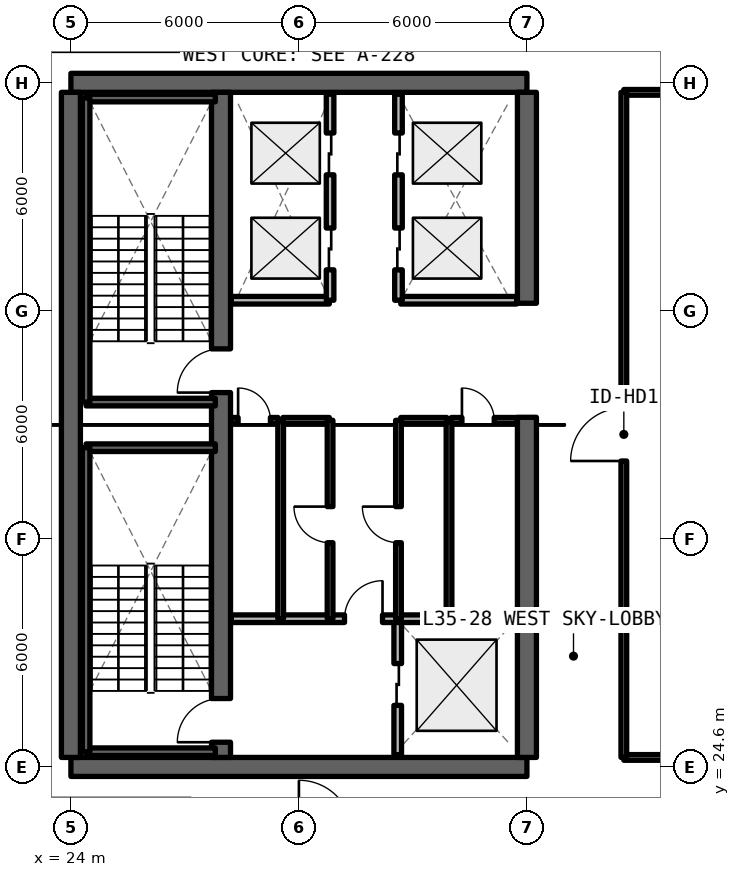
"""IFC4 building model, lengths in metres.
Left out: names, types, materials, properties, quantities, classifications, styles, units other than length and angle.
Written with IfcOpenShell. Run it as: python <this file> out.ifc"""

import sys

from ifc_helpers import new_model, si_unit, direction, frame, frame_2d, origin, place, context, subcontext, project, spatial, rectangle, extrude, element, fill, save


model = new_model("IFC4")
c1 = context("Model", 3, precision=1e-05, world=origin(), true_north=direction((0.0, 1.0)))
c2 = subcontext(c1, "Body", "Model", "MODEL_VIEW")
j1 = project(units=[si_unit("LENGTHUNIT", "METRE"), si_unit("PLANEANGLEUNIT", "RADIAN")], contexts=[c1])
p1 = place(None, origin())
s1 = spatial("IfcSite", under=j1, at=p1, CompositionType="ELEMENT")
p2 = place(p1, origin())
s2 = spatial("IfcBuilding", under=s1, at=p2, CompositionType="ELEMENT")
p3 = place(p2, frame((0.0, 0.0, 128.04)))
s3 = spatial("IfcBuildingStorey", under=s2, at=p3, CompositionType="ELEMENT", Elevation=128.04)
for number, where, z_axis, x_axis in (
    (1, (24.0, 24.6, 0.0), (0.0, 0.0, 1.0), (1.0, 0.0, 0.0)),
    (2, (36.0, 42.6, 0.0), (0.0, 0.0, 1.0), (-1.0, 0.0, 0.0)),
):
    element("IfcWall", number, at=place(p3, frame(where, z_axis=z_axis, x_axis=x_axis)), inside=s3, PredefinedType="SHEAR", context=c2, shape_type="SweptSolid", body=[
        extrude(rectangle(XDim=12.0, YDim=0.5, at=frame_2d((6.0, 0.0))), origin(), (0.0, 0.0, 1.0), 3.96),
    ])
p4 = place(p3, frame((24.0, 24.85, 0.0), z_axis=(0.0, 0.0, 1.0), x_axis=(0.0, 1.0, 0.0)))
e3 = element("IfcWall", 3, at=p4, inside=s3, PredefinedType="SHEAR", context=c2, shape_type="SweptSolid", body=[
    extrude(rectangle(XDim=17.5, YDim=0.5, at=frame_2d((8.75, 0.0))), origin(), (0.0, 0.0, 1.0), 3.96),
])
p5 = place(p3, frame((36.0, 24.85, 0.0), z_axis=(0.0, 0.0, 1.0), x_axis=(0.0, 1.0, 0.0)))
e4 = element("IfcWall", 4, at=p5, inside=s3, PredefinedType="SHEAR", context=c2, shape_type="SweptSolid", body=[
    extrude(rectangle(XDim=8.95, YDim=0.5, at=frame_2d((4.475, 0.0))), origin(), (0.0, 0.0, 1.0), 3.96),
])
p6 = place(p3, frame((36.0, 36.8, 0.0), z_axis=(0.0, 0.0, 1.0), x_axis=(0.0, 1.0, 0.0)))
e5 = element("IfcWall", 5, at=p6, inside=s3, PredefinedType="SHEAR", context=c2, shape_type="SweptSolid", body=[
    extrude(rectangle(XDim=5.55, YDim=0.5, at=frame_2d((2.775, 0.0))), origin(), (0.0, 0.0, 1.0), 3.96),
])
p7 = place(p3, frame((27.95, 24.85, 0.0), z_axis=(0.0, 0.0, 1.0), x_axis=(0.0, 1.0, 0.0)))
e6 = element("IfcWall", 6, at=p7, inside=s3, PredefinedType="SHEAR", context=c2, shape_type="SweptSolid", body=[
    extrude(rectangle(XDim=17.5, YDim=0.5, at=frame_2d((8.75, 0.0))), origin(), (0.0, 0.0, 1.0), 3.96),
])
p8 = place(p7, frame((0.4, 0.0, 0.0)))
e7 = element("IfcOpeningElement", 7, at=p8, cuts=e6, PredefinedType="OPENING", context=c2, shape_type="SweptSolid", body=[
    extrude(rectangle(XDim=1.15, YDim=2.15, at=frame_2d((0.575, 1.075))), frame((0.0, 0.26, 0.0), z_axis=(0.0, -1.0, 0.0), x_axis=(1.0, 0.0, 0.0)), (0.0, 0.0, 1.0), 0.52),
])
p9 = place(p7, frame((9.6, 0.0, 0.0)))
e8 = element("IfcOpeningElement", 8, at=p9, cuts=e6, PredefinedType="OPENING", context=c2, shape_type="SweptSolid", body=[
    extrude(rectangle(XDim=1.15, YDim=2.15, at=frame_2d((0.575, 1.075))), frame((0.0, 0.26, 0.0), z_axis=(0.0, -1.0, 0.0), x_axis=(1.0, 0.0, 0.0)), (0.0, 0.0, 1.0), 0.52),
])
p10 = place(p3, frame((32.6, 24.92, 0.0), z_axis=(0.0, 0.0, 1.0), x_axis=(0.0, 1.0, 0.0)))
e9 = element("IfcWall", 9, at=p10, inside=s3, PredefinedType="SOLIDWALL", context=c2, shape_type="SweptSolid", body=[
    extrude(rectangle(XDim=3.58, YDim=0.2, at=frame_2d((1.79, 0.0))), origin(), (0.0, 0.0, 1.0), 2.96),
])
p11 = place(p10, frame((1.3, 0.0, 0.0)))
e10 = element("IfcOpeningElement", 10, at=p11, cuts=e9, PredefinedType="OPENING", context=c2, shape_type="SweptSolid", body=[
    extrude(rectangle(XDim=1.1, YDim=2.2, at=frame_2d((0.55, 1.1))), frame((0.0, 0.11, 0.0), z_axis=(0.0, -1.0, 0.0), x_axis=(1.0, 0.0, 0.0)), (0.0, 0.0, 1.0), 0.22),
])
p12 = place(p3, frame((28.22, 28.5, 0.0), z_axis=(0.0, 0.0, 1.0), x_axis=(1.0, 0.0, 0.0)))
e11 = element("IfcWall", 11, at=p12, inside=s3, PredefinedType="SOLIDWALL", context=c2, shape_type="SweptSolid", body=[
    extrude(rectangle(XDim=7.51, YDim=0.2, at=frame_2d((3.755, 0.0))), origin(), (0.0, 0.0, 1.0), 2.96),
])
p13 = place(p12, frame((2.98, 0.0, 0.0)))
e12 = element("IfcOpeningElement", 12, at=p13, cuts=e11, PredefinedType="OPENING", context=c2, shape_type="SweptSolid", body=[
    extrude(rectangle(XDim=1.0, YDim=2.15, at=frame_2d((0.5, 1.075))), frame((0.0, 0.11, 0.0), z_axis=(0.0, -1.0, 0.0), x_axis=(1.0, 0.0, 0.0)), (0.0, 0.0, 1.0), 0.22),
])
p14 = place(p3, frame((29.52, 28.5, 0.0), z_axis=(0.0, 0.0, 1.0), x_axis=(0.0, 1.0, 0.0)))
e13 = element("IfcWall", 13, at=p14, inside=s3, PredefinedType="SOLIDWALL", context=c2, shape_type="SweptSolid", body=[
    extrude(rectangle(XDim=5.22, YDim=0.15, at=frame_2d((2.61, 0.0))), origin(), (0.0, 0.0, 1.0), 2.96),
])
p15 = place(p3, frame((28.22, 33.72, 0.0), z_axis=(0.0, 0.0, 1.0), x_axis=(1.0, 0.0, 0.0)))
e14 = element("IfcWall", 14, at=p15, inside=s3, PredefinedType="SOLIDWALL", context=c2, shape_type="SweptSolid", body=[
    extrude(rectangle(XDim=1.23, YDim=0.15, at=frame_2d((0.615, 0.0))), origin(), (0.0, 0.0, 1.0), 2.96),
])
p16 = place(p15, frame((0.18, 0.0, 0.0)))
e15 = element("IfcOpeningElement", 15, at=p16, cuts=e14, PredefinedType="OPENING", context=c2, shape_type="SweptSolid", body=[
    extrude(rectangle(XDim=0.85, YDim=2.1, at=frame_2d((0.425, 1.05))), frame((0.0, 0.085, 0.0), z_axis=(0.0, -1.0, 0.0), x_axis=(1.0, 0.0, 0.0)), (0.0, 0.0, 1.0), 0.17),
])
p17 = place(p3, frame((29.58, 33.72, 0.0), z_axis=(0.0, 0.0, 1.0), x_axis=(1.0, 0.0, 0.0)))
e16 = element("IfcWall", 16, at=p17, inside=s3, PredefinedType="SOLIDWALL", context=c2, shape_type="SweptSolid", body=[
    extrude(rectangle(XDim=1.22, YDim=0.15, at=frame_2d((0.61, 0.0))), origin(), (0.0, 0.0, 1.0), 2.96),
])
p18 = place(p3, frame((30.82, 28.5, 0.0), z_axis=(0.0, 0.0, 1.0), x_axis=(0.0, 1.0, 0.0)))
e17 = element("IfcWall", 17, at=p18, inside=s3, PredefinedType="SOLIDWALL", context=c2, shape_type="SweptSolid", body=[
    extrude(rectangle(XDim=5.22, YDim=0.15, at=frame_2d((2.61, 0.0))), origin(), (0.0, 0.0, 1.0), 2.96),
])
p19 = place(p18, frame((2.0, 0.0, 0.0)))
e18 = element("IfcOpeningElement", 18, at=p19, cuts=e17, PredefinedType="OPENING", context=c2, shape_type="SweptSolid", body=[
    extrude(rectangle(XDim=0.95, YDim=2.15, at=frame_2d((0.475, 1.075))), frame((0.0, 0.085, 0.0), z_axis=(0.0, -1.0, 0.0), x_axis=(1.0, 0.0, 0.0)), (0.0, 0.0, 1.0), 0.17),
])
p20 = place(p3, frame((33.95, 28.5, 0.0), z_axis=(0.0, 0.0, 1.0), x_axis=(0.0, 1.0, 0.0)))
e19 = element("IfcWall", 19, at=p20, inside=s3, PredefinedType="SOLIDWALL", context=c2, shape_type="SweptSolid", body=[
    extrude(rectangle(XDim=5.22, YDim=0.15, at=frame_2d((2.61, 0.0))), origin(), (0.0, 0.0, 1.0), 2.96),
])
p21 = place(p3, frame((32.68, 33.72, 0.0), z_axis=(0.0, 0.0, 1.0), x_axis=(1.0, 0.0, 0.0)))
e20 = element("IfcWall", 20, at=p21, inside=s3, PredefinedType="SOLIDWALL", context=c2, shape_type="SweptSolid", body=[
    extrude(rectangle(XDim=1.21, YDim=0.15, at=frame_2d((0.605, 0.0))), origin(), (0.0, 0.0, 1.0), 2.96),
])
p22 = place(p3, frame((34.01, 33.72, 0.0), z_axis=(0.0, 0.0, 1.0), x_axis=(1.0, 0.0, 0.0)))
e21 = element("IfcWall", 21, at=p22, inside=s3, PredefinedType="SOLIDWALL", context=c2, shape_type="SweptSolid", body=[
    extrude(rectangle(XDim=1.72, YDim=0.15, at=frame_2d((0.86, 0.0))), origin(), (0.0, 0.0, 1.0), 2.96),
])
p23 = place(p22, frame((0.28, 0.0, 0.0)))
e22 = element("IfcOpeningElement", 22, at=p23, cuts=e21, PredefinedType="OPENING", context=c2, shape_type="SweptSolid", body=[
    extrude(rectangle(XDim=0.85, YDim=2.1, at=frame_2d((0.425, 1.05))), frame((0.0, 0.085, 0.0), z_axis=(0.0, -1.0, 0.0), x_axis=(1.0, 0.0, 0.0)), (0.0, 0.0, 1.0), 0.17),
])
p24 = place(p3, frame((32.62, 28.5, 0.0), z_axis=(0.0, 0.0, 1.0), x_axis=(0.0, 1.0, 0.0)))
e23 = element("IfcWall", 23, at=p24, inside=s3, PredefinedType="SOLIDWALL", context=c2, shape_type="SweptSolid", body=[
    extrude(rectangle(XDim=5.22, YDim=0.15, at=frame_2d((2.61, 0.0))), origin(), (0.0, 0.0, 1.0), 2.96),
])
p25 = place(p24, frame((2.0, 0.0, 0.0)))
e24 = element("IfcOpeningElement", 24, at=p25, cuts=e23, PredefinedType="OPENING", context=c2, shape_type="SweptSolid", body=[
    extrude(rectangle(XDim=0.95, YDim=2.15, at=frame_2d((0.475, 1.075))), frame((0.0, 0.085, 0.0), z_axis=(0.0, -1.0, 0.0), x_axis=(1.0, 0.0, 0.0)), (0.0, 0.0, 1.0), 0.17),
])
p26 = place(p3, frame((28.22, 36.88, 0.0), z_axis=(0.0, 0.0, 1.0), x_axis=(1.0, 0.0, 0.0)))
e25 = element("IfcWall", 25, at=p26, inside=s3, PredefinedType="SOLIDWALL", context=c2, shape_type="SweptSolid", body=[
    extrude(rectangle(XDim=2.58, YDim=0.2, at=frame_2d((1.29, 0.0))), origin(), (0.0, 0.0, 1.0), 2.96),
])
p27 = place(p3, frame((30.82, 36.88, 0.0), z_axis=(0.0, 0.0, 1.0), x_axis=(0.0, 1.0, 0.0)))
e26 = element("IfcWall", 26, at=p27, inside=s3, PredefinedType="SOLIDWALL", context=c2, shape_type="SweptSolid", body=[
    extrude(rectangle(XDim=5.42, YDim=0.2, at=frame_2d((2.71, 0.0))), origin(), (0.0, 0.0, 1.0), 2.96),
])
p28 = place(p27, frame((0.8, 0.0, 0.0)))
e27 = element("IfcOpeningElement", 27, at=p28, cuts=e26, PredefinedType="OPENING", context=c2, shape_type="SweptSolid", body=[
    extrude(rectangle(XDim=1.1, YDim=2.2, at=frame_2d((0.55, 1.1))), frame((0.0, 0.11, 0.0), z_axis=(0.0, -1.0, 0.0), x_axis=(1.0, 0.0, 0.0)), (0.0, 0.0, 1.0), 0.22),
])
p29 = place(p27, frame((3.3, 0.0, 0.0)))
e28 = element("IfcOpeningElement", 28, at=p29, cuts=e26, PredefinedType="OPENING", context=c2, shape_type="SweptSolid", body=[
    extrude(rectangle(XDim=1.1, YDim=2.2, at=frame_2d((0.55, 1.1))), frame((0.0, 0.11, 0.0), z_axis=(0.0, -1.0, 0.0), x_axis=(1.0, 0.0, 0.0)), (0.0, 0.0, 1.0), 0.22),
])
p30 = place(p3, frame((32.68, 36.88, 0.0), z_axis=(0.0, 0.0, 1.0), x_axis=(1.0, 0.0, 0.0)))
e29 = element("IfcWall", 29, at=p30, inside=s3, PredefinedType="SOLIDWALL", context=c2, shape_type="SweptSolid", body=[
    extrude(rectangle(XDim=3.05, YDim=0.2, at=frame_2d((1.525, 0.0))), origin(), (0.0, 0.0, 1.0), 2.96),
])
p31 = place(p3, frame((32.62, 36.88, 0.0), z_axis=(0.0, 0.0, 1.0), x_axis=(0.0, 1.0, 0.0)))
e30 = element("IfcWall", 30, at=p31, inside=s3, PredefinedType="SOLIDWALL", context=c2, shape_type="SweptSolid", body=[
    extrude(rectangle(XDim=5.42, YDim=0.2, at=frame_2d((2.71, 0.0))), origin(), (0.0, 0.0, 1.0), 2.96),
])
p32 = place(p31, frame((0.8, 0.0, 0.0)))
e31 = element("IfcOpeningElement", 31, at=p32, cuts=e30, PredefinedType="OPENING", context=c2, shape_type="SweptSolid", body=[
    extrude(rectangle(XDim=1.1, YDim=2.2, at=frame_2d((0.55, 1.1))), frame((0.0, 0.11, 0.0), z_axis=(0.0, -1.0, 0.0), x_axis=(1.0, 0.0, 0.0)), (0.0, 0.0, 1.0), 0.22),
])
p33 = place(p31, frame((3.3, 0.0, 0.0)))
e32 = element("IfcOpeningElement", 32, at=p33, cuts=e30, PredefinedType="OPENING", context=c2, shape_type="SweptSolid", body=[
    extrude(rectangle(XDim=1.1, YDim=2.2, at=frame_2d((0.55, 1.1))), frame((0.0, 0.11, 0.0), z_axis=(0.0, -1.0, 0.0), x_axis=(1.0, 0.0, 0.0)), (0.0, 0.0, 1.0), 0.22),
])
for number, where, z_axis, x_axis in (
    (33, (38.55, 24.85, 0.0), (0.0, 0.0, 1.0), (1.0, 0.0, 0.0)),
    (34, (38.55, 42.35, 0.0), (0.0, 0.0, 1.0), (1.0, 0.0, 0.0)),
):
    element("IfcWall", number, at=place(p3, frame(where, z_axis=z_axis, x_axis=x_axis)), inside=s3, PredefinedType="SOLIDWALL", context=c2, shape_type="SweptSolid", body=[
        extrude(rectangle(XDim=36.9, YDim=0.15, at=frame_2d((18.45, 0.0))), origin(), (0.0, 0.0, 1.0), 2.96),
    ])
p34 = place(p3, frame((38.55, 24.85, 0.0), z_axis=(0.0, 0.0, 1.0), x_axis=(0.0, 1.0, 0.0)))
e35 = element("IfcWall", 35, at=p34, inside=s3, PredefinedType="SOLIDWALL", context=c2, shape_type="SweptSolid", body=[
    extrude(rectangle(XDim=17.5, YDim=0.15, at=frame_2d((8.75, 0.0))), origin(), (0.0, 0.0, 1.0), 2.96),
])
p35 = place(p34, frame((7.8, 0.0, 0.0)))
e36 = element("IfcOpeningElement", 36, at=p35, cuts=e35, PredefinedType="OPENING", context=c2, shape_type="SweptSolid", body=[
    extrude(rectangle(XDim=1.4, YDim=2.15, at=frame_2d((0.7, 1.075))), frame((0.0, 0.085, 0.0), z_axis=(0.0, -1.0, 0.0), x_axis=(1.0, 0.0, 0.0)), (0.0, 0.0, 1.0), 0.17),
])
for number, where, z_axis, x_axis in (
    (37, (24.4, 25.0, 0.0), (0.0, 0.0, 1.0), (1.0, 0.0, 0.0)),
    (38, (27.8, 33.0, 0.0), (0.0, 0.0, 1.0), (-1.0, 0.0, 0.0)),
):
    element("IfcWall", number, at=place(p3, frame(where, z_axis=z_axis, x_axis=x_axis)), inside=s3, PredefinedType="SOLIDWALL", context=c2, shape_type="SweptSolid", body=[
        extrude(rectangle(XDim=3.4, YDim=0.2, at=frame_2d((1.7, 0.0))), origin(), (0.0, 0.0, 1.0), 3.96),
    ])
p36 = place(p3, frame((24.4, 33.0, 0.0), z_axis=(0.0, 0.0, 1.0), x_axis=(0.0, -1.0, 0.0)))
e39 = element("IfcWall", 39, at=p36, inside=s3, PredefinedType="SOLIDWALL", context=c2, shape_type="SweptSolid", body=[
    extrude(rectangle(XDim=8.0, YDim=0.2, at=frame_2d((4.0, 0.0))), origin(), (0.0, 0.0, 1.0), 3.96),
])
for number, where, z_axis, x_axis in (
    (40, (24.4, 34.2, 0.0), (0.0, 0.0, 1.0), (1.0, 0.0, 0.0)),
    (41, (27.8, 42.2, 0.0), (0.0, 0.0, 1.0), (-1.0, 0.0, 0.0)),
):
    element("IfcWall", number, at=place(p3, frame(where, z_axis=z_axis, x_axis=x_axis)), inside=s3, PredefinedType="SOLIDWALL", context=c2, shape_type="SweptSolid", body=[
        extrude(rectangle(XDim=3.4, YDim=0.2, at=frame_2d((1.7, 0.0))), origin(), (0.0, 0.0, 1.0), 3.96),
    ])
p37 = place(p3, frame((24.4, 42.2, 0.0), z_axis=(0.0, 0.0, 1.0), x_axis=(0.0, -1.0, 0.0)))
e42 = element("IfcWall", 42, at=p37, inside=s3, PredefinedType="SOLIDWALL", context=c2, shape_type="SweptSolid", body=[
    extrude(rectangle(XDim=8.0, YDim=0.2, at=frame_2d((4.0, 0.0))), origin(), (0.0, 0.0, 1.0), 3.96),
])
p38 = place(p11, origin())
e43 = element("IfcDoor", 43, at=p38, inside=s3, OperationType="SLIDING_TO_LEFT", PredefinedType="DOOR", context=c2, shape_type="SweptSolid", body=[
    extrude(rectangle(XDim=1.1, YDim=2.2, at=frame_2d((0.55, 1.1))), frame((0.0, 0.025, 0.0), z_axis=(0.0, -1.0, 0.0), x_axis=(1.0, 0.0, 0.0)), (0.0, 0.0, 1.0), 0.05),
])
fill(e10, e43)
p39 = place(p13, origin())
e44 = element("IfcDoor", 44, at=p39, inside=s3, OperationType="SINGLE_SWING_RIGHT", PredefinedType="DOOR", context=c2, shape_type="SweptSolid", body=[
    extrude(rectangle(XDim=1.0, YDim=2.15, at=frame_2d((0.5, 1.075))), frame((0.0, 0.025, 0.0), z_axis=(0.0, -1.0, 0.0), x_axis=(1.0, 0.0, 0.0)), (0.0, 0.0, 1.0), 0.05),
])
fill(e12, e44)
p40 = place(p16, origin())
e45 = element("IfcDoor", 45, at=p40, inside=s3, OperationType="SINGLE_SWING_LEFT", PredefinedType="DOOR", context=c2, shape_type="SweptSolid", body=[
    extrude(rectangle(XDim=0.85, YDim=2.1, at=frame_2d((0.425, 1.05))), frame((0.0, 0.025, 0.0), z_axis=(0.0, -1.0, 0.0), x_axis=(1.0, 0.0, 0.0)), (0.0, 0.0, 1.0), 0.05),
])
fill(e15, e45)
p41 = place(p19, origin())
e46 = element("IfcDoor", 46, at=p41, inside=s3, OperationType="SINGLE_SWING_RIGHT", PredefinedType="DOOR", context=c2, shape_type="SweptSolid", body=[
    extrude(rectangle(XDim=0.95, YDim=2.15, at=frame_2d((0.475, 1.075))), frame((0.0, 0.025, 0.0), z_axis=(0.0, -1.0, 0.0), x_axis=(1.0, 0.0, 0.0)), (0.0, 0.0, 1.0), 0.05),
])
fill(e18, e46)
p42 = place(p23, origin())
e47 = element("IfcDoor", 47, at=p42, inside=s3, OperationType="SINGLE_SWING_LEFT", PredefinedType="DOOR", context=c2, shape_type="SweptSolid", body=[
    extrude(rectangle(XDim=0.85, YDim=2.1, at=frame_2d((0.425, 1.05))), frame((0.0, 0.025, 0.0), z_axis=(0.0, -1.0, 0.0), x_axis=(1.0, 0.0, 0.0)), (0.0, 0.0, 1.0), 0.05),
])
fill(e22, e47)
p43 = place(p25, origin())
e48 = element("IfcDoor", 48, at=p43, inside=s3, OperationType="SINGLE_SWING_RIGHT", PredefinedType="DOOR", context=c2, shape_type="SweptSolid", body=[
    extrude(rectangle(XDim=0.95, YDim=2.15, at=frame_2d((0.475, 1.075))), frame((0.0, 0.025, 0.0), z_axis=(0.0, -1.0, 0.0), x_axis=(1.0, 0.0, 0.0)), (0.0, 0.0, 1.0), 0.05),
])
fill(e24, e48)
p44 = place(p28, origin())
e49 = element("IfcDoor", 49, at=p44, inside=s3, OperationType="SLIDING_TO_LEFT", PredefinedType="DOOR", context=c2, shape_type="SweptSolid", body=[
    extrude(rectangle(XDim=1.1, YDim=2.2, at=frame_2d((0.55, 1.1))), frame((0.0, 0.025, 0.0), z_axis=(0.0, -1.0, 0.0), x_axis=(1.0, 0.0, 0.0)), (0.0, 0.0, 1.0), 0.05),
])
fill(e27, e49)
p45 = place(p29, origin())
e50 = element("IfcDoor", 50, at=p45, inside=s3, OperationType="SLIDING_TO_RIGHT", PredefinedType="DOOR", context=c2, shape_type="SweptSolid", body=[
    extrude(rectangle(XDim=1.1, YDim=2.2, at=frame_2d((0.55, 1.1))), frame((0.0, 0.025, 0.0), z_axis=(0.0, -1.0, 0.0), x_axis=(1.0, 0.0, 0.0)), (0.0, 0.0, 1.0), 0.05),
])
fill(e28, e50)
p46 = place(p32, origin())
e51 = element("IfcDoor", 51, at=p46, inside=s3, OperationType="SLIDING_TO_LEFT", PredefinedType="DOOR", context=c2, shape_type="SweptSolid", body=[
    extrude(rectangle(XDim=1.1, YDim=2.2, at=frame_2d((0.55, 1.1))), frame((0.0, 0.025, 0.0), z_axis=(0.0, -1.0, 0.0), x_axis=(1.0, 0.0, 0.0)), (0.0, 0.0, 1.0), 0.05),
])
fill(e31, e51)
p47 = place(p33, origin())
e52 = element("IfcDoor", 52, at=p47, inside=s3, OperationType="SLIDING_TO_RIGHT", PredefinedType="DOOR", context=c2, shape_type="SweptSolid", body=[
    extrude(rectangle(XDim=1.1, YDim=2.2, at=frame_2d((0.55, 1.1))), frame((0.0, 0.025, 0.0), z_axis=(0.0, -1.0, 0.0), x_axis=(1.0, 0.0, 0.0)), (0.0, 0.0, 1.0), 0.05),
])
fill(e32, e52)
p48 = place(p35, origin())
e53 = element("IfcDoor", 53, at=p48, inside=s3, OperationType="SINGLE_SWING_LEFT", PredefinedType="DOOR", context=c2, shape_type="SweptSolid", body=[
    extrude(rectangle(XDim=1.4, YDim=2.15, at=frame_2d((0.7, 1.075))), frame((0.0, 0.025, 0.0), z_axis=(0.0, -1.0, 0.0), x_axis=(1.0, 0.0, 0.0)), (0.0, 0.0, 1.0), 0.05),
])
fill(e36, e53)
p49 = place(p8, origin())
e54 = element("IfcDoor", 54, at=p49, inside=s3, OperationType="SINGLE_SWING_LEFT", PredefinedType="DOOR", context=c2, shape_type="SweptSolid", body=[
    extrude(rectangle(XDim=1.15, YDim=2.15, at=frame_2d((0.575, 1.075))), frame((0.0, 0.025, 0.0), z_axis=(0.0, -1.0, 0.0), x_axis=(1.0, 0.0, 0.0)), (0.0, 0.0, 1.0), 0.05),
])
fill(e7, e54)
p50 = place(p9, origin())
e55 = element("IfcDoor", 55, at=p50, inside=s3, OperationType="SINGLE_SWING_RIGHT", PredefinedType="DOOR", context=c2, shape_type="SweptSolid", body=[
    extrude(rectangle(XDim=1.15, YDim=2.15, at=frame_2d((0.575, 1.075))), frame((0.0, 0.025, 0.0), z_axis=(0.0, -1.0, 0.0), x_axis=(1.0, 0.0, 0.0)), (0.0, 0.0, 1.0), 0.05),
])
fill(e8, e55)
save(model, sys.argv[1])
